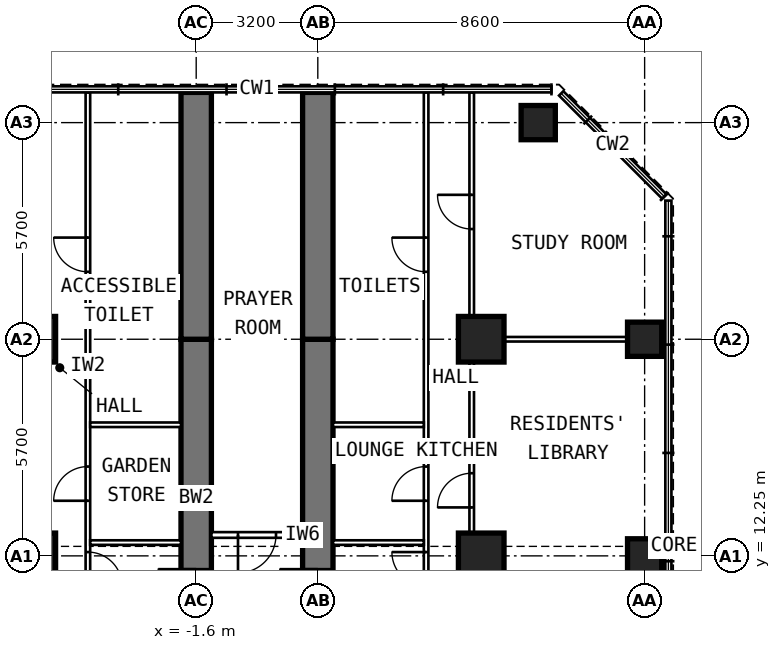
"""IFC4 building model, lengths in metres.
Left out: names, types, materials, properties, quantities, classifications, styles, units other than length and angle.
Written with IfcOpenShell. Run it as: python <this file> out.ifc"""

import sys

from ifc_helpers import new_model, si_unit, direction, frame, frame_2d, origin, origin_2d, place, context, subcontext, project, spatial, rectangle, extrude, element, fill, save


model = new_model("IFC4")
c1 = context("Model", 3, precision=1e-05, world=origin(), true_north=direction((0.0, 1.0)))
c2 = subcontext(c1, "Body", "Model", "MODEL_VIEW")
j1 = project(units=[si_unit("LENGTHUNIT", "METRE"), si_unit("PLANEANGLEUNIT", "RADIAN")], contexts=[c1])
p1 = place(None, origin())
s1 = spatial("IfcSite", under=j1, at=p1, CompositionType="ELEMENT")
p2 = place(p1, origin())
s2 = spatial("IfcBuilding", under=s1, at=p2, CompositionType="ELEMENT")
p3 = place(p2, frame((0.0, 0.0, 152.6)))
s3 = spatial("IfcBuildingStorey", under=s2, at=p3, CompositionType="ELEMENT", Elevation=152.6)
for number, where, z_axis, x_axis in (
    (1, (10.2, 12.25, 0.0), (0.0, 0.0, 1.0), (0.0, 1.0, 0.0)),
    (2, (10.2, 17.95, 0.0), (0.0, 0.0, 1.0), (0.0, 1.0, 0.0)),
    (3, (7.4, 23.65, 0.0), (0.0, 0.0, 1.0), (0.0, 1.0, 0.0)),
):
    element("IfcColumn", number, at=place(p3, frame(where, z_axis=z_axis, x_axis=x_axis)), inside=s3, PredefinedType="COLUMN", context=c2, shape_type="SweptSolid", body=[
        extrude(rectangle(XDim=0.9, YDim=0.9, at=origin_2d()), origin(), (0.0, 0.0, 1.0), 5.4),
    ])
for number, where, z_axis, x_axis in (
    (4, (-5.9, 12.25, 0.0), (0.0, 0.0, 1.0), (0.0, 1.0, 0.0)),
    (5, (-5.9, 17.95, 0.0), (0.0, 0.0, 1.0), (0.0, 1.0, 0.0)),
    (6, (5.9, 12.25, 0.0), (0.0, 0.0, 1.0), (0.0, 1.0, 0.0)),
    (7, (5.9, 17.95, 0.0), (0.0, 0.0, 1.0), (0.0, 1.0, 0.0)),
):
    element("IfcColumn", number, at=place(p3, frame(where, z_axis=z_axis, x_axis=x_axis)), inside=s3, PredefinedType="COLUMN", context=c2, shape_type="SweptSolid", body=[
        extrude(rectangle(XDim=1.2, YDim=1.2, at=origin_2d()), origin(), (0.0, 0.0, 1.0), 5.4),
    ])
p4 = place(p3, frame((-1.6, 9.6, 0.0), z_axis=(0.0, 0.0, 1.0), x_axis=(0.0, 1.0, 0.0)))
e8 = element("IfcWall", 8, at=p4, inside=s3, PredefinedType="SHEAR", context=c2, shape_type="SweptSolid", body=[
    extrude(rectangle(XDim=8.35, YDim=0.8, at=frame_2d((4.175, 0.0))), origin(), (0.0, 0.0, 1.0), 5.4),
])
p5 = place(p4, frame((1.3, 0.0, 0.0)))
e9 = element("IfcOpeningElement", 9, at=p5, cuts=e8, PredefinedType="OPENING", context=c2, shape_type="SweptSolid", body=[
    extrude(rectangle(XDim=1.0, YDim=2.1, at=frame_2d((0.5, 1.05))), frame((0.0, 0.412, 0.0), z_axis=(0.0, -1.0, 0.0), x_axis=(1.0, 0.0, 0.0)), (0.0, 0.0, 1.0), 0.824),
])
p6 = place(p3, frame((-1.6, 17.95, 0.0), z_axis=(0.0, 0.0, 1.0), x_axis=(0.0, 1.0, 0.0)))
e10 = element("IfcWall", 10, at=p6, inside=s3, PredefinedType="SHEAR", context=c2, shape_type="SweptSolid", body=[
    extrude(rectangle(XDim=6.495, YDim=0.8, at=frame_2d((3.248, 0.0))), origin(), (0.0, 0.0, 1.0), 5.4),
])
p7 = place(p3, frame((1.6, 9.6, 0.0), z_axis=(0.0, 0.0, 1.0), x_axis=(0.0, 1.0, 0.0)))
e11 = element("IfcWall", 11, at=p7, inside=s3, PredefinedType="SHEAR", context=c2, shape_type="SweptSolid", body=[
    extrude(rectangle(XDim=8.35, YDim=0.8, at=frame_2d((4.175, 0.0))), origin(), (0.0, 0.0, 1.0), 5.4),
])
p8 = place(p7, frame((1.3, 0.0, 0.0)))
e12 = element("IfcOpeningElement", 12, at=p8, cuts=e11, PredefinedType="OPENING", context=c2, shape_type="SweptSolid", body=[
    extrude(rectangle(XDim=1.0, YDim=2.1, at=frame_2d((0.5, 1.05))), frame((0.0, 0.412, 0.0), z_axis=(0.0, -1.0, 0.0), x_axis=(1.0, 0.0, 0.0)), (0.0, 0.0, 1.0), 0.824),
])
p9 = place(p3, frame((1.6, 17.95, 0.0), z_axis=(0.0, 0.0, 1.0), x_axis=(0.0, 1.0, 0.0)))
e13 = element("IfcWall", 13, at=p9, inside=s3, PredefinedType="SHEAR", context=c2, shape_type="SweptSolid", body=[
    extrude(rectangle(XDim=6.495, YDim=0.8, at=frame_2d((3.248, 0.0))), origin(), (0.0, 0.0, 1.0), 5.4),
])
p10 = place(p3, frame((-4.45, 10.05, 0.0), z_axis=(0.0, 0.0, 1.0), x_axis=(0.0, 1.0, 0.0)))
e14 = element("IfcWall", 14, at=p10, inside=s3, PredefinedType="PARTITIONING", context=c2, shape_type="SweptSolid", body=[
    extrude(rectangle(XDim=14.395, YDim=0.12, at=frame_2d((7.198, 0.0))), origin(), (0.0, 0.0, 1.0), 5.15),
])
p11 = place(p10, frame((1.4, 0.0, 0.0)))
e15 = element("IfcOpeningElement", 15, at=p11, cuts=e14, PredefinedType="OPENING", context=c2, shape_type="SweptSolid", body=[
    extrude(rectangle(XDim=0.9, YDim=2.1, at=frame_2d((0.45, 1.05))), frame((0.0, 0.072, 0.0), z_axis=(0.0, -1.0, 0.0), x_axis=(1.0, 0.0, 0.0)), (0.0, 0.0, 1.0), 0.144),
])
p12 = place(p10, frame((3.65, 0.0, 0.0)))
e16 = element("IfcOpeningElement", 16, at=p12, cuts=e14, PredefinedType="OPENING", context=c2, shape_type="SweptSolid", body=[
    extrude(rectangle(XDim=0.9, YDim=2.1, at=frame_2d((0.45, 1.05))), frame((0.0, 0.072, 0.0), z_axis=(0.0, -1.0, 0.0), x_axis=(1.0, 0.0, 0.0)), (0.0, 0.0, 1.0), 0.144),
])
p13 = place(p10, frame((9.675, 0.0, 0.0)))
e17 = element("IfcOpeningElement", 17, at=p13, cuts=e14, PredefinedType="OPENING", context=c2, shape_type="SweptSolid", body=[
    extrude(rectangle(XDim=0.9, YDim=2.1, at=frame_2d((0.45, 1.05))), frame((0.0, 0.072, 0.0), z_axis=(0.0, -1.0, 0.0), x_axis=(1.0, 0.0, 0.0)), (0.0, 0.0, 1.0), 0.144),
])
p14 = place(p3, frame((-2.0, 12.6, 0.0), z_axis=(0.0, 0.0, 1.0), x_axis=(-1.0, 0.0, 0.0)))
e18 = element("IfcWall", 18, at=p14, inside=s3, PredefinedType="PARTITIONING", context=c2, shape_type="SweptSolid", body=[
    extrude(rectangle(XDim=2.39, YDim=0.12, at=frame_2d((1.195, 0.0))), origin(), (0.0, 0.0, 1.0), 4.25),
])
p15 = place(p3, frame((-2.0, 15.7, 0.0), z_axis=(0.0, 0.0, 1.0), x_axis=(-1.0, 0.0, 0.0)))
e19 = element("IfcWall", 19, at=p15, inside=s3, PredefinedType="PARTITIONING", context=c2, shape_type="SweptSolid", body=[
    extrude(rectangle(XDim=2.39, YDim=0.12, at=frame_2d((1.195, 0.0))), origin(), (0.0, 0.0, 1.0), 5.15),
])
p16 = place(p3, frame((4.45, 10.05, 0.0), z_axis=(0.0, 0.0, 1.0), x_axis=(0.0, 1.0, 0.0)))
e20 = element("IfcWall", 20, at=p16, inside=s3, PredefinedType="PARTITIONING", context=c2, shape_type="SweptSolid", body=[
    extrude(rectangle(XDim=14.395, YDim=0.12, at=frame_2d((7.198, 0.0))), origin(), (0.0, 0.0, 1.0), 5.15),
])
p17 = place(p16, frame((1.4, 0.0, 0.0)))
e21 = element("IfcOpeningElement", 21, at=p17, cuts=e20, PredefinedType="OPENING", context=c2, shape_type="SweptSolid", body=[
    extrude(rectangle(XDim=0.9, YDim=2.1, at=frame_2d((0.45, 1.05))), frame((0.0, 0.072, 0.0), z_axis=(0.0, -1.0, 0.0), x_axis=(1.0, 0.0, 0.0)), (0.0, 0.0, 1.0), 0.144),
])
p18 = place(p16, frame((3.65, 0.0, 0.0)))
e22 = element("IfcOpeningElement", 22, at=p18, cuts=e20, PredefinedType="OPENING", context=c2, shape_type="SweptSolid", body=[
    extrude(rectangle(XDim=0.9, YDim=2.1, at=frame_2d((0.45, 1.05))), frame((0.0, 0.072, 0.0), z_axis=(0.0, -1.0, 0.0), x_axis=(1.0, 0.0, 0.0)), (0.0, 0.0, 1.0), 0.144),
])
p19 = place(p16, frame((9.675, 0.0, 0.0)))
e23 = element("IfcOpeningElement", 23, at=p19, cuts=e20, PredefinedType="OPENING", context=c2, shape_type="SweptSolid", body=[
    extrude(rectangle(XDim=0.9, YDim=2.1, at=frame_2d((0.45, 1.05))), frame((0.0, 0.072, 0.0), z_axis=(0.0, -1.0, 0.0), x_axis=(1.0, 0.0, 0.0)), (0.0, 0.0, 1.0), 0.144),
])
p20 = place(p3, frame((5.65, 9.6, 0.0), z_axis=(0.0, 0.0, 1.0), x_axis=(0.0, 1.0, 0.0)))
e24 = element("IfcWall", 24, at=p20, inside=s3, PredefinedType="PARTITIONING", context=c2, shape_type="SweptSolid", body=[
    extrude(rectangle(XDim=14.845, YDim=0.12, at=frame_2d((7.422, 0.0))), origin(), (0.0, 0.0, 1.0), 5.15),
])
p21 = place(p20, frame((3.925, 0.0, 0.0)))
e25 = element("IfcOpeningElement", 25, at=p21, cuts=e24, PredefinedType="OPENING", context=c2, shape_type="SweptSolid", body=[
    extrude(rectangle(XDim=0.9, YDim=2.1, at=frame_2d((0.45, 1.05))), frame((0.0, 0.072, 0.0), z_axis=(0.0, -1.0, 0.0), x_axis=(1.0, 0.0, 0.0)), (0.0, 0.0, 1.0), 0.144),
])
p22 = place(p20, frame((11.25, 0.0, 0.0)))
e26 = element("IfcOpeningElement", 26, at=p22, cuts=e24, PredefinedType="OPENING", context=c2, shape_type="SweptSolid", body=[
    extrude(rectangle(XDim=0.9, YDim=2.1, at=frame_2d((0.45, 1.05))), frame((0.0, 0.072, 0.0), z_axis=(0.0, -1.0, 0.0), x_axis=(1.0, 0.0, 0.0)), (0.0, 0.0, 1.0), 0.144),
])
p23 = place(p3, frame((5.71, 17.95, 0.0), z_axis=(0.0, 0.0, 1.0), x_axis=(1.0, 0.0, 0.0)))
e27 = element("IfcWall", 27, at=p23, inside=s3, PredefinedType="PARTITIONING", context=c2, shape_type="SweptSolid", body=[
    extrude(rectangle(XDim=5.035, YDim=0.12, at=frame_2d((2.518, 0.0))), origin(), (0.0, 0.0, 1.0), 4.25),
])
p24 = place(p3, frame((2.0, 12.6, 0.0), z_axis=(0.0, 0.0, 1.0), x_axis=(1.0, 0.0, 0.0)))
e28 = element("IfcWall", 28, at=p24, inside=s3, PredefinedType="PARTITIONING", context=c2, shape_type="SweptSolid", body=[
    extrude(rectangle(XDim=2.39, YDim=0.12, at=frame_2d((1.195, 0.0))), origin(), (0.0, 0.0, 1.0), 4.25),
])
p25 = place(p3, frame((2.0, 15.7, 0.0), z_axis=(0.0, 0.0, 1.0), x_axis=(1.0, 0.0, 0.0)))
e29 = element("IfcWall", 29, at=p25, inside=s3, PredefinedType="PARTITIONING", context=c2, shape_type="SweptSolid", body=[
    extrude(rectangle(XDim=2.39, YDim=0.12, at=frame_2d((1.195, 0.0))), origin(), (0.0, 0.0, 1.0), 5.15),
])
p26 = place(p3, frame((1.2, 12.8, 0.0), z_axis=(0.0, 0.0, 1.0), x_axis=(-1.0, 0.0, 0.0)))
e30 = element("IfcWall", 30, at=p26, inside=s3, PredefinedType="PARTITIONING", context=c2, shape_type="SweptSolid", body=[
    extrude(rectangle(XDim=2.4, YDim=0.15, at=frame_2d((1.2, 0.0))), origin(), (0.0, 0.0, 1.0), 5.15),
])
p27 = place(p26, frame((0.7, 0.0, 0.0)))
e31 = element("IfcOpeningElement", 31, at=p27, cuts=e30, PredefinedType="OPENING", context=c2, shape_type="SweptSolid", body=[
    extrude(rectangle(XDim=1.0, YDim=2.1, at=frame_2d((0.5, 1.05))), frame((0.0, 0.087, 0.0), z_axis=(0.0, -1.0, 0.0), x_axis=(1.0, 0.0, 0.0)), (0.0, 0.0, 1.0), 0.174),
])
p28 = place(p5, origin())
e32 = element("IfcDoor", 32, at=p28, inside=s3, OperationType="SINGLE_SWING_RIGHT", PredefinedType="DOOR", context=c2, shape_type="SweptSolid", body=[
    extrude(rectangle(XDim=1.0, YDim=2.1, at=frame_2d((0.5, 1.05))), frame((0.0, 0.15, 0.0), z_axis=(0.0, -1.0, 0.0), x_axis=(1.0, 0.0, 0.0)), (0.0, 0.0, 1.0), 0.3),
])
fill(e9, e32)
p29 = place(p11, frame((0.9, 0.0, 0.0), z_axis=(0.0, 0.0, 1.0), x_axis=(-1.0, 0.0, 0.0)))
e33 = element("IfcDoor", 33, at=p29, inside=s3, OperationType="SINGLE_SWING_RIGHT", PredefinedType="DOOR", context=c2, shape_type="SweptSolid", body=[
    extrude(rectangle(XDim=0.9, YDim=2.1, at=frame_2d((0.45, 1.05))), frame((0.0, 0.025, 0.0), z_axis=(0.0, -1.0, 0.0), x_axis=(1.0, 0.0, 0.0)), (0.0, 0.0, 1.0), 0.05),
])
fill(e15, e33)
p30 = place(p12, origin())
e34 = element("IfcDoor", 34, at=p30, inside=s3, OperationType="SINGLE_SWING_LEFT", PredefinedType="DOOR", context=c2, shape_type="SweptSolid", body=[
    extrude(rectangle(XDim=0.9, YDim=2.1, at=frame_2d((0.45, 1.05))), frame((0.0, 0.025, 0.0), z_axis=(0.0, -1.0, 0.0), x_axis=(1.0, 0.0, 0.0)), (0.0, 0.0, 1.0), 0.05),
])
fill(e16, e34)
p31 = place(p13, origin())
e35 = element("IfcDoor", 35, at=p31, inside=s3, OperationType="SINGLE_SWING_RIGHT", PredefinedType="DOOR", context=c2, shape_type="SweptSolid", body=[
    extrude(rectangle(XDim=0.9, YDim=2.1, at=frame_2d((0.45, 1.05))), frame((0.0, 0.025, 0.0), z_axis=(0.0, -1.0, 0.0), x_axis=(1.0, 0.0, 0.0)), (0.0, 0.0, 1.0), 0.05),
])
fill(e17, e35)
p32 = place(p8, origin())
e36 = element("IfcDoor", 36, at=p32, inside=s3, OperationType="SINGLE_SWING_RIGHT", PredefinedType="DOOR", context=c2, shape_type="SweptSolid", body=[
    extrude(rectangle(XDim=1.0, YDim=2.1, at=frame_2d((0.5, 1.05))), frame((0.0, 0.15, 0.0), z_axis=(0.0, -1.0, 0.0), x_axis=(1.0, 0.0, 0.0)), (0.0, 0.0, 1.0), 0.3),
])
fill(e12, e36)
p33 = place(p21, origin())
e37 = element("IfcDoor", 37, at=p33, inside=s3, OperationType="SINGLE_SWING_LEFT", PredefinedType="DOOR", context=c2, shape_type="SweptSolid", body=[
    extrude(rectangle(XDim=0.9, YDim=2.1, at=frame_2d((0.45, 1.05))), frame((0.0, 0.025, 0.0), z_axis=(0.0, -1.0, 0.0), x_axis=(1.0, 0.0, 0.0)), (0.0, 0.0, 1.0), 0.05),
])
fill(e25, e37)
p34 = place(p22, origin())
e38 = element("IfcDoor", 38, at=p34, inside=s3, OperationType="SINGLE_SWING_RIGHT", PredefinedType="DOOR", context=c2, shape_type="SweptSolid", body=[
    extrude(rectangle(XDim=0.9, YDim=2.1, at=frame_2d((0.45, 1.05))), frame((0.0, 0.025, 0.0), z_axis=(0.0, -1.0, 0.0), x_axis=(1.0, 0.0, 0.0)), (0.0, 0.0, 1.0), 0.05),
])
fill(e26, e38)
p35 = place(p17, origin())
e39 = element("IfcDoor", 39, at=p35, inside=s3, OperationType="SINGLE_SWING_RIGHT", PredefinedType="DOOR", context=c2, shape_type="SweptSolid", body=[
    extrude(rectangle(XDim=0.9, YDim=2.1, at=frame_2d((0.45, 1.05))), frame((0.0, 0.025, 0.0), z_axis=(0.0, -1.0, 0.0), x_axis=(1.0, 0.0, 0.0)), (0.0, 0.0, 1.0), 0.05),
])
fill(e21, e39)
p36 = place(p18, origin())
e40 = element("IfcDoor", 40, at=p36, inside=s3, OperationType="SINGLE_SWING_LEFT", PredefinedType="DOOR", context=c2, shape_type="SweptSolid", body=[
    extrude(rectangle(XDim=0.9, YDim=2.1, at=frame_2d((0.45, 1.05))), frame((0.0, 0.025, 0.0), z_axis=(0.0, -1.0, 0.0), x_axis=(1.0, 0.0, 0.0)), (0.0, 0.0, 1.0), 0.05),
])
fill(e22, e40)
p37 = place(p19, origin())
e41 = element("IfcDoor", 41, at=p37, inside=s3, OperationType="SINGLE_SWING_RIGHT", PredefinedType="DOOR", context=c2, shape_type="SweptSolid", body=[
    extrude(rectangle(XDim=0.9, YDim=2.1, at=frame_2d((0.45, 1.05))), frame((0.0, 0.025, 0.0), z_axis=(0.0, -1.0, 0.0), x_axis=(1.0, 0.0, 0.0)), (0.0, 0.0, 1.0), 0.05),
])
fill(e23, e41)
p38 = place(p27, origin())
e42 = element("IfcDoor", 42, at=p38, inside=s3, OperationType="SINGLE_SWING_RIGHT", PredefinedType="DOOR", context=c2, shape_type="SweptSolid", body=[
    extrude(rectangle(XDim=1.0, YDim=2.1, at=frame_2d((0.5, 1.05))), frame((0.0, 0.025, 0.0), z_axis=(0.0, -1.0, 0.0), x_axis=(1.0, 0.0, 0.0)), (0.0, 0.0, 1.0), 0.05),
])
fill(e31, e42)
save(model, sys.argv[1])
